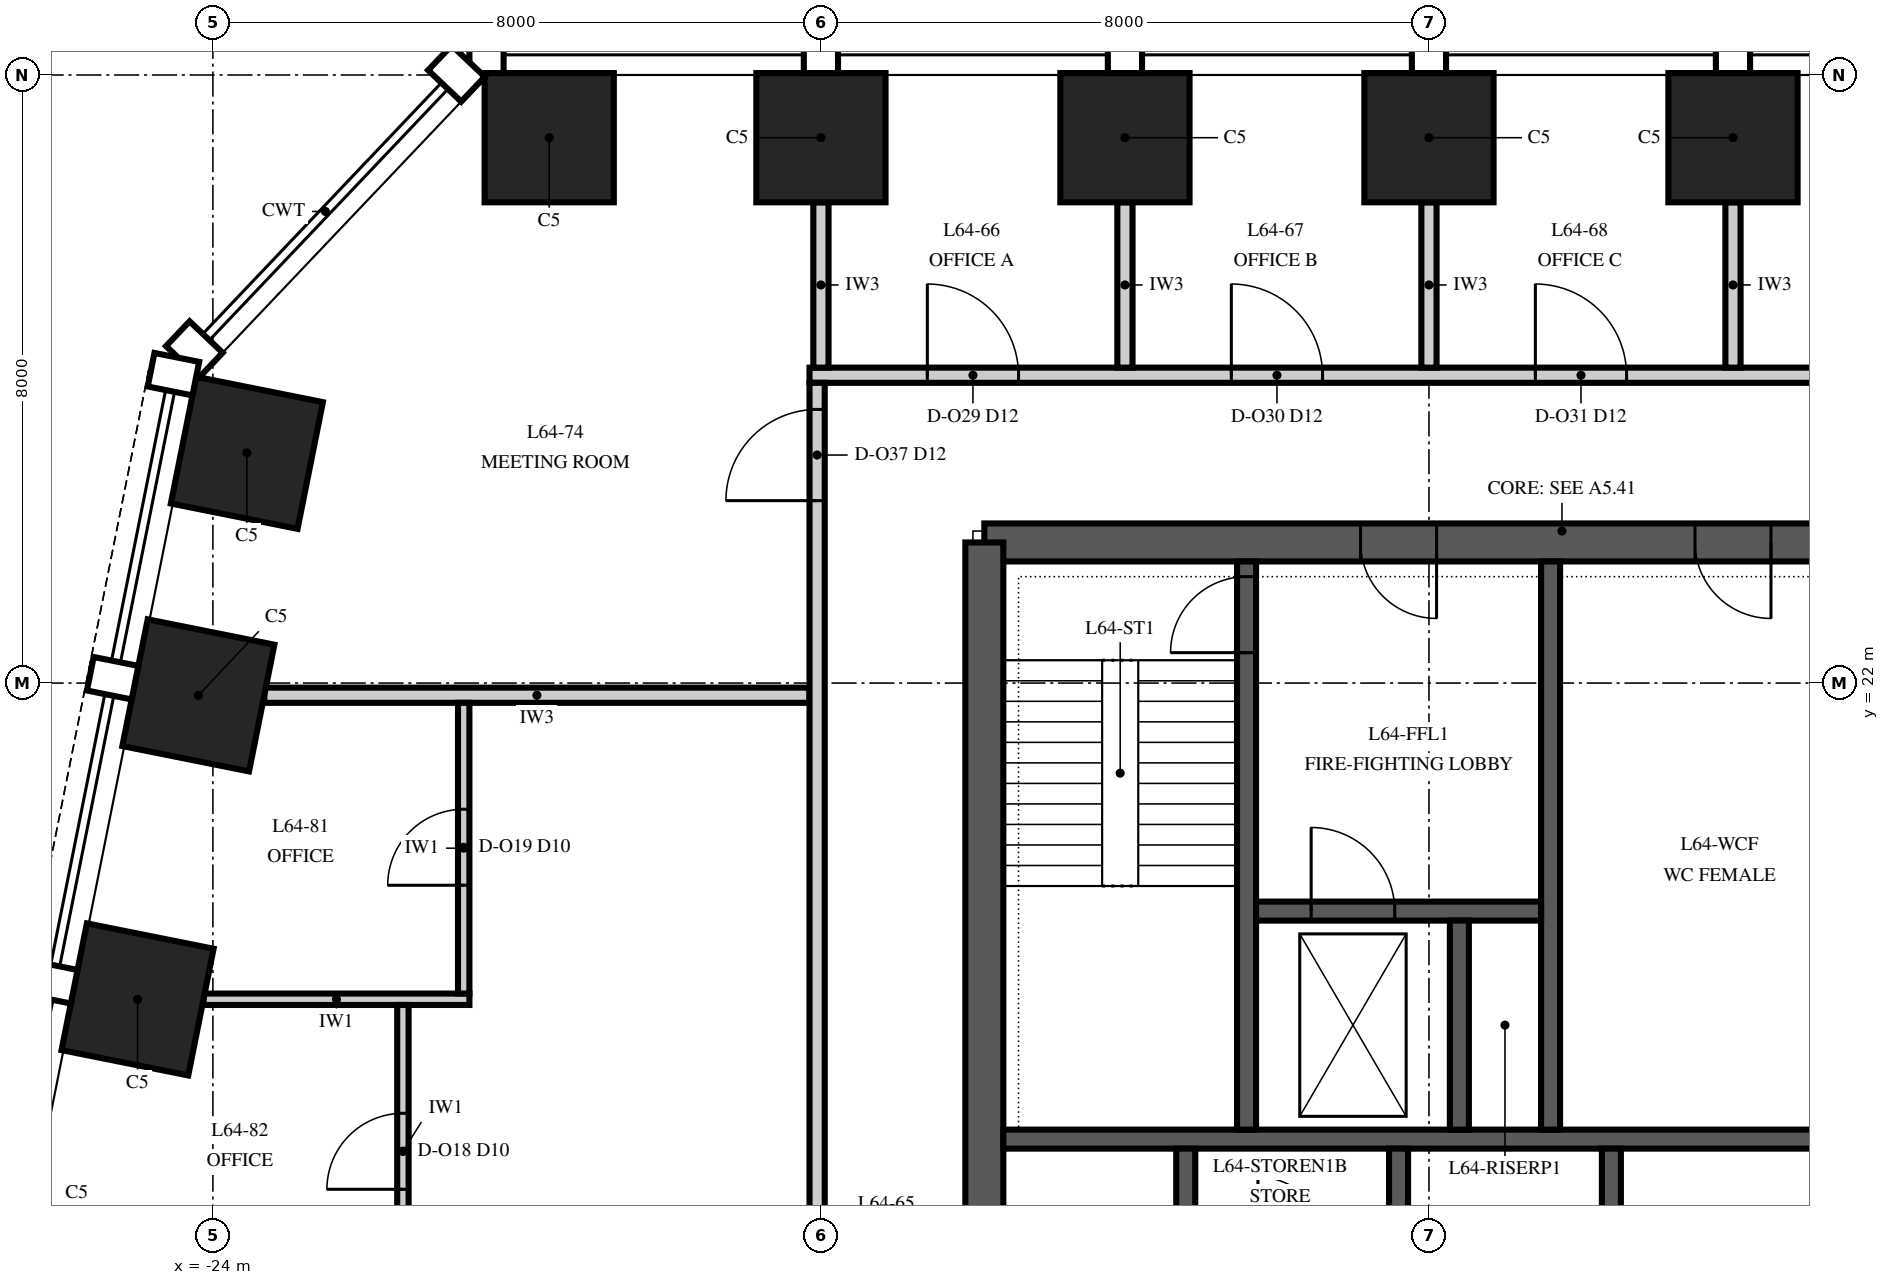
"""IFC4 building model, lengths in metres.
Left out: names, types, materials, properties, quantities, classifications, styles, units other than length and angle.
Written with IfcOpenShell. Run it as: python <this file> out.ifc"""

import sys

from ifc_helpers import new_model, si_unit, direction, frame, frame_2d, origin, origin_2d, place, context, subcontext, project, spatial, polyline, rectangle, outline, extrude, element, fill, save


model = new_model("IFC4")
c1 = context("Model", 3, precision=1e-05, world=origin(), true_north=direction((0.0, 1.0)))
c2 = subcontext(c1, "Body", "Model", "MODEL_VIEW")
j1 = project(units=[si_unit("LENGTHUNIT", "METRE"), si_unit("PLANEANGLEUNIT", "RADIAN")], contexts=[c1])
p1 = place(None, origin())
s1 = spatial("IfcSite", under=j1, at=p1, CompositionType="ELEMENT")
p2 = place(p1, origin())
s2 = spatial("IfcBuilding", under=s1, at=p2, CompositionType="ELEMENT")
p3 = place(p2, frame((0.0, 0.0, 276.0)))
s3 = spatial("IfcBuildingStorey", under=s2, at=p3, CompositionType="ELEMENT", Elevation=276.0)
for number, where, z_axis, x_axis in (
    (1, (-4.0, 29.175, 0.0), (0.0, 0.0, 1.0), (-1.0, 0.0, 0.0)),
    (2, (-8.0, 29.175, 0.0), (0.0, 0.0, 1.0), (-1.0, 0.0, 0.0)),
    (3, (-12.0, 29.175, 0.0), (0.0, 0.0, 1.0), (-1.0, 0.0, 0.0)),
    (4, (-16.0, 29.175, 0.0), (0.0, 0.0, 1.0), (-1.0, 0.0, 0.0)),
    (5, (-19.575, 29.175, 0.0), (0.0, 0.0, 1.0), (-1.0, 0.0, 0.0)),
    (6, (-23.553, 25.029, 0.0), (0.0, 0.0, 1.0), (-0.196, -0.981, 0.0)),
    (7, (-24.191, 21.838, 0.0), (0.0, 0.0, 1.0), (-0.196, -0.981, 0.0)),
    (8, (-24.991, 17.838, 0.0), (0.0, 0.0, 1.0), (-0.196, -0.981, 0.0)),
):
    element("IfcColumn", number, at=place(p3, frame(where, z_axis=z_axis, x_axis=x_axis)), inside=s3, PredefinedType="COLUMN", context=c2, shape_type="SweptSolid", body=[
        extrude(rectangle(XDim=1.7, YDim=1.7, at=origin_2d()), origin(), (0.0, 0.0, 1.0), 4.0),
    ])
p4 = place(p3, frame((13.85, 23.85, 0.0), z_axis=(0.0, 0.0, 1.0), x_axis=(-1.0, 0.0, 0.0)))
e9 = element("IfcWall", 9, at=p4, inside=s3, PredefinedType="SHEAR", context=c2, shape_type="SweptSolid", body=[
    extrude(rectangle(XDim=27.7, YDim=0.5, at=frame_2d((13.85, 0.0))), origin(), (0.0, 0.0, 1.0), 4.0),
])
p5 = place(p4, frame((21.75, 0.0, 0.0)))
e10 = element("IfcOpeningElement", 10, at=p5, cuts=e9, PredefinedType="OPENING", context=c2, shape_type="SweptSolid", body=[
    extrude(rectangle(XDim=1.0, YDim=2.1, at=frame_2d((0.5, 1.05))), frame((0.0, 0.265, 0.0), z_axis=(0.0, -1.0, 0.0), x_axis=(1.0, 0.0, 0.0)), (0.0, 0.0, 1.0), 0.53),
])
p6 = place(p4, frame((4.95, 0.0, 0.0)))
e11 = element("IfcOpeningElement", 11, at=p6, cuts=e9, PredefinedType="OPENING", context=c2, shape_type="SweptSolid", body=[
    extrude(rectangle(XDim=1.0, YDim=2.1, at=frame_2d((0.5, 1.05))), frame((0.0, 0.265, 0.0), z_axis=(0.0, -1.0, 0.0), x_axis=(1.0, 0.0, 0.0)), (0.0, 0.0, 1.0), 0.53),
])
p7 = place(p4, frame((17.35, 0.0, 0.0)))
e12 = element("IfcOpeningElement", 12, at=p7, cuts=e9, PredefinedType="OPENING", context=c2, shape_type="SweptSolid", body=[
    extrude(rectangle(XDim=1.0, YDim=2.1, at=frame_2d((0.5, 1.05))), frame((0.0, 0.265, 0.0), z_axis=(0.0, -1.0, 0.0), x_axis=(1.0, 0.0, 0.0)), (0.0, 0.0, 1.0), 0.53),
])
p8 = place(p4, frame((13.35, 0.0, 0.0)))
e13 = element("IfcOpeningElement", 13, at=p8, cuts=e9, PredefinedType="OPENING", context=c2, shape_type="SweptSolid", body=[
    extrude(rectangle(XDim=1.0, YDim=2.1, at=frame_2d((0.5, 1.05))), frame((0.0, 0.265, 0.0), z_axis=(0.0, -1.0, 0.0), x_axis=(1.0, 0.0, 0.0)), (0.0, 0.0, 1.0), 0.53),
])
p9 = place(p4, frame((9.35, 0.0, 0.0)))
e14 = element("IfcOpeningElement", 14, at=p9, cuts=e9, PredefinedType="OPENING", context=c2, shape_type="SweptSolid", body=[
    extrude(rectangle(XDim=1.0, YDim=2.1, at=frame_2d((0.5, 1.05))), frame((0.0, 0.265, 0.0), z_axis=(0.0, -1.0, 0.0), x_axis=(1.0, 0.0, 0.0)), (0.0, 0.0, 1.0), 0.53),
])
p10 = place(p3, frame((-13.85, 23.85, 0.0), z_axis=(0.0, 0.0, 1.0), x_axis=(0.0, -1.0, 0.0)))
e15 = element("IfcWall", 15, at=p10, inside=s3, PredefinedType="SHEAR", context=c2, shape_type="SweptSolid", body=[
    extrude(outline(polyline([(0.0, -0.25), (17.7, -0.25), (17.7, 0.0), (17.45, 0.0), (17.45, 0.25), (0.25, 0.25), (0.25, 0.0), (0.0, 0.0), (0.0, -0.25)])), origin(), (0.0, 0.0, 1.0), 4.0),
])
p11 = place(p10, frame((11.75, 0.0, 0.0)))
e16 = element("IfcOpeningElement", 16, at=p11, cuts=e15, PredefinedType="OPENING", context=c2, shape_type="SweptSolid", body=[
    extrude(rectangle(XDim=1.8, YDim=2.4, at=frame_2d((0.9, 1.2))), frame((0.0, 0.265, 0.0), z_axis=(0.0, -1.0, 0.0), x_axis=(1.0, 0.0, 0.0)), (0.0, 0.0, 1.0), 0.53),
])
p12 = place(p3, frame((-13.6, 16.0, 0.0), z_axis=(0.0, 0.0, 1.0), x_axis=(1.0, 0.0, 0.0)))
e17 = element("IfcWall", 17, at=p12, inside=s3, PredefinedType="SHEAR", context=c2, shape_type="SweptSolid", body=[
    extrude(rectangle(XDim=27.2, YDim=0.25, at=frame_2d((13.6, 0.0))), origin(), (0.0, 0.0, 1.0), 4.0),
])
for number, where, z_axis, x_axis in (
    (18, (-11.2, 13.125, 0.0), (0.0, 0.0, 1.0), (0.0, 1.0, 0.0)),
    (19, (-8.4, 13.125, 0.0), (0.0, 0.0, 1.0), (0.0, 1.0, 0.0)),
    (20, (-5.6, 13.125, 0.0), (0.0, 0.0, 1.0), (0.0, 1.0, 0.0)),
):
    element("IfcWall", number, at=place(p3, frame(where, z_axis=z_axis, x_axis=x_axis)), inside=s3, PredefinedType="SHEAR", context=c2, shape_type="SweptSolid", body=[
        extrude(rectangle(XDim=2.75, YDim=0.25, at=frame_2d((1.375, 0.0))), origin(), (0.0, 0.0, 1.0), 4.0),
    ])
p13 = place(p3, frame((-10.4, 16.125, 0.0), z_axis=(0.0, 0.0, 1.0), x_axis=(0.0, 1.0, 0.0)))
e21 = element("IfcWall", 21, at=p13, inside=s3, PredefinedType="SHEAR", context=c2, shape_type="SweptSolid", body=[
    extrude(rectangle(XDim=7.475, YDim=0.25, at=frame_2d((3.738, 0.0))), origin(), (0.0, 0.0, 1.0), 4.0),
])
p14 = place(p13, frame((6.275, 0.0, 0.0)))
e22 = element("IfcOpeningElement", 22, at=p14, cuts=e21, PredefinedType="OPENING", context=c2, shape_type="SweptSolid", body=[
    extrude(rectangle(XDim=1.0, YDim=2.1, at=frame_2d((0.5, 1.05))), frame((0.0, 0.14, 0.0), z_axis=(0.0, -1.0, 0.0), x_axis=(1.0, 0.0, 0.0)), (0.0, 0.0, 1.0), 0.28),
])
p15 = place(p3, frame((-6.4, 16.125, 0.0), z_axis=(0.0, 0.0, 1.0), x_axis=(0.0, 1.0, 0.0)))
e23 = element("IfcWall", 23, at=p15, inside=s3, PredefinedType="SHEAR", context=c2, shape_type="SweptSolid", body=[
    extrude(rectangle(XDim=7.475, YDim=0.25, at=frame_2d((3.738, 0.0))), origin(), (0.0, 0.0, 1.0), 4.0),
])
p16 = place(p3, frame((-10.275, 19.0, 0.0), z_axis=(0.0, 0.0, 1.0), x_axis=(1.0, 0.0, 0.0)))
e24 = element("IfcWall", 24, at=p16, inside=s3, PredefinedType="SHEAR", context=c2, shape_type="SweptSolid", body=[
    extrude(rectangle(XDim=3.75, YDim=0.25, at=frame_2d((1.875, 0.0))), origin(), (0.0, 0.0, 1.0), 4.0),
])
p17 = place(p16, frame((0.725, 0.0, 0.0)))
e25 = element("IfcOpeningElement", 25, at=p17, cuts=e24, PredefinedType="OPENING", context=c2, shape_type="SweptSolid", body=[
    extrude(rectangle(XDim=1.1, YDim=2.1, at=frame_2d((0.55, 1.05))), frame((0.0, 0.14, 0.0), z_axis=(0.0, -1.0, 0.0), x_axis=(1.0, 0.0, 0.0)), (0.0, 0.0, 1.0), 0.28),
])
p18 = place(p3, frame((-7.6, 16.125, 0.0), z_axis=(0.0, 0.0, 1.0), x_axis=(0.0, 1.0, 0.0)))
e26 = element("IfcWall", 26, at=p18, inside=s3, PredefinedType="SHEAR", context=c2, shape_type="SweptSolid", body=[
    extrude(rectangle(XDim=2.75, YDim=0.25, at=frame_2d((1.375, 0.0))), origin(), (0.0, 0.0, 1.0), 4.0),
])
p19 = place(p3, frame((-24.124, 17.84, 0.0), z_axis=(0.0, 0.0, 1.0), x_axis=(1.0, 0.0, 0.0)))
e27 = element("IfcWall", 27, at=p19, inside=s3, PredefinedType="PARTITIONING", context=c2, shape_type="SweptSolid", body=[
    extrude(rectangle(XDim=3.499, YDim=0.15, at=frame_2d((1.75, 0.0))), origin(), (0.0, 0.0, 1.0), 3.23),
])
p20 = place(p3, frame((-23.324, 21.84, 0.0), z_axis=(0.0, 0.0, 1.0), x_axis=(1.0, 0.0, 0.0)))
e28 = element("IfcWall", 28, at=p20, inside=s3, PredefinedType="PARTITIONING", context=c2, shape_type="SweptSolid", body=[
    extrude(rectangle(XDim=7.174, YDim=0.2, at=frame_2d((3.587, 0.0))), origin(), (0.0, 0.0, 1.0), 3.23),
])
p21 = place(p3, frame((-16.15, 26.05, 0.0), z_axis=(0.0, 0.0, 1.0), x_axis=(1.0, 0.0, 0.0)))
e29 = element("IfcWall", 29, at=p21, inside=s3, PredefinedType="PARTITIONING", context=c2, shape_type="SweptSolid", body=[
    extrude(rectangle(XDim=32.3, YDim=0.2, at=frame_2d((16.15, 0.0))), origin(), (0.0, 0.0, 1.0), 3.418),
])
p22 = place(p21, frame((1.55, 0.0, 0.0)))
e30 = element("IfcOpeningElement", 30, at=p22, cuts=e29, PredefinedType="OPENING", context=c2, shape_type="SweptSolid", body=[
    extrude(rectangle(XDim=1.2, YDim=2.4, at=frame_2d((0.6, 1.2))), frame((0.0, 0.115, 0.0), z_axis=(0.0, -1.0, 0.0), x_axis=(1.0, 0.0, 0.0)), (0.0, 0.0, 1.0), 0.23),
])
p23 = place(p21, frame((5.55, 0.0, 0.0)))
e31 = element("IfcOpeningElement", 31, at=p23, cuts=e29, PredefinedType="OPENING", context=c2, shape_type="SweptSolid", body=[
    extrude(rectangle(XDim=1.2, YDim=2.4, at=frame_2d((0.6, 1.2))), frame((0.0, 0.115, 0.0), z_axis=(0.0, -1.0, 0.0), x_axis=(1.0, 0.0, 0.0)), (0.0, 0.0, 1.0), 0.23),
])
p24 = place(p21, frame((9.55, 0.0, 0.0)))
e32 = element("IfcOpeningElement", 32, at=p24, cuts=e29, PredefinedType="OPENING", context=c2, shape_type="SweptSolid", body=[
    extrude(rectangle(XDim=1.2, YDim=2.4, at=frame_2d((0.6, 1.2))), frame((0.0, 0.115, 0.0), z_axis=(0.0, -1.0, 0.0), x_axis=(1.0, 0.0, 0.0)), (0.0, 0.0, 1.0), 0.23),
])
p25 = place(p21, frame((13.55, 0.0, 0.0)))
e33 = element("IfcOpeningElement", 33, at=p25, cuts=e29, PredefinedType="OPENING", context=c2, shape_type="SweptSolid", body=[
    extrude(rectangle(XDim=1.2, YDim=2.4, at=frame_2d((0.6, 1.2))), frame((0.0, 0.115, 0.0), z_axis=(0.0, -1.0, 0.0), x_axis=(1.0, 0.0, 0.0)), (0.0, 0.0, 1.0), 0.23),
])
p26 = place(p21, frame((17.55, 0.0, 0.0)))
e34 = element("IfcOpeningElement", 34, at=p26, cuts=e29, PredefinedType="OPENING", context=c2, shape_type="SweptSolid", body=[
    extrude(rectangle(XDim=1.2, YDim=2.4, at=frame_2d((0.6, 1.2))), frame((0.0, 0.115, 0.0), z_axis=(0.0, -1.0, 0.0), x_axis=(1.0, 0.0, 0.0)), (0.0, 0.0, 1.0), 0.23),
])
p27 = place(p21, frame((21.55, 0.0, 0.0)))
e35 = element("IfcOpeningElement", 35, at=p27, cuts=e29, PredefinedType="OPENING", context=c2, shape_type="SweptSolid", body=[
    extrude(rectangle(XDim=1.2, YDim=2.4, at=frame_2d((0.6, 1.2))), frame((0.0, 0.115, 0.0), z_axis=(0.0, -1.0, 0.0), x_axis=(1.0, 0.0, 0.0)), (0.0, 0.0, 1.0), 0.23),
])
p28 = place(p21, frame((25.55, 0.0, 0.0)))
e36 = element("IfcOpeningElement", 36, at=p28, cuts=e29, PredefinedType="OPENING", context=c2, shape_type="SweptSolid", body=[
    extrude(rectangle(XDim=1.2, YDim=2.4, at=frame_2d((0.6, 1.2))), frame((0.0, 0.115, 0.0), z_axis=(0.0, -1.0, 0.0), x_axis=(1.0, 0.0, 0.0)), (0.0, 0.0, 1.0), 0.23),
])
p29 = place(p21, frame((29.55, 0.0, 0.0)))
e37 = element("IfcOpeningElement", 37, at=p29, cuts=e29, PredefinedType="OPENING", context=c2, shape_type="SweptSolid", body=[
    extrude(rectangle(XDim=1.2, YDim=2.4, at=frame_2d((0.6, 1.2))), frame((0.0, 0.115, 0.0), z_axis=(0.0, -1.0, 0.0), x_axis=(1.0, 0.0, 0.0)), (0.0, 0.0, 1.0), 0.23),
])
p30 = place(p3, frame((-21.5, 13.915, 0.0), z_axis=(0.0, 0.0, 1.0), x_axis=(0.0, 1.0, 0.0)))
e38 = element("IfcWall", 38, at=p30, inside=s3, PredefinedType="PARTITIONING", context=c2, shape_type="SweptSolid", body=[
    extrude(rectangle(XDim=3.85, YDim=0.15, at=frame_2d((1.925, 0.0))), origin(), (0.0, 0.0, 1.0), 3.23),
])
p31 = place(p30, frame((1.425, 0.0, 0.0)))
e39 = element("IfcOpeningElement", 39, at=p31, cuts=e38, PredefinedType="OPENING", context=c2, shape_type="SweptSolid", body=[
    extrude(rectangle(XDim=1.0, YDim=2.3, at=frame_2d((0.5, 1.15))), frame((0.0, 0.09, 0.0), z_axis=(0.0, -1.0, 0.0), x_axis=(1.0, 0.0, 0.0)), (0.0, 0.0, 1.0), 0.18),
])
p32 = place(p3, frame((-20.7, 17.915, 0.0), z_axis=(0.0, 0.0, 1.0), x_axis=(0.0, 1.0, 0.0)))
e40 = element("IfcWall", 40, at=p32, inside=s3, PredefinedType="PARTITIONING", context=c2, shape_type="SweptSolid", body=[
    extrude(rectangle(XDim=3.825, YDim=0.15, at=frame_2d((1.913, 0.0))), origin(), (0.0, 0.0, 1.0), 3.23),
])
p33 = place(p32, frame((1.425, 0.0, 0.0)))
e41 = element("IfcOpeningElement", 41, at=p33, cuts=e40, PredefinedType="OPENING", context=c2, shape_type="SweptSolid", body=[
    extrude(rectangle(XDim=1.0, YDim=2.3, at=frame_2d((0.5, 1.15))), frame((0.0, 0.09, 0.0), z_axis=(0.0, -1.0, 0.0), x_axis=(1.0, 0.0, 0.0)), (0.0, 0.0, 1.0), 0.18),
])
p34 = place(p3, frame((-16.05, 1.94, 0.0), z_axis=(0.0, 0.0, 1.0), x_axis=(0.0, 1.0, 0.0)))
e42 = element("IfcWall", 42, at=p34, inside=s3, PredefinedType="PARTITIONING", context=c2, shape_type="SweptSolid", body=[
    extrude(rectangle(XDim=24.01, YDim=0.2, at=frame_2d((12.005, 0.0))), origin(), (0.0, 0.0, 1.0), 2.842),
])
p35 = place(p34, frame((8.46, 0.0, 0.0)))
e43 = element("IfcOpeningElement", 43, at=p35, cuts=e42, PredefinedType="OPENING", context=c2, shape_type="SweptSolid", body=[
    extrude(rectangle(XDim=1.2, YDim=2.4, at=frame_2d((0.6, 1.2))), frame((0.0, 0.115, 0.0), z_axis=(0.0, -1.0, 0.0), x_axis=(1.0, 0.0, 0.0)), (0.0, 0.0, 1.0), 0.23),
])
p36 = place(p34, frame((22.46, 0.0, 0.0)))
e44 = element("IfcOpeningElement", 44, at=p36, cuts=e42, PredefinedType="OPENING", context=c2, shape_type="SweptSolid", body=[
    extrude(rectangle(XDim=1.2, YDim=2.4, at=frame_2d((0.6, 1.2))), frame((0.0, 0.115, 0.0), z_axis=(0.0, -1.0, 0.0), x_axis=(1.0, 0.0, 0.0)), (0.0, 0.0, 1.0), 0.23),
])
for number, where, z_axis, x_axis in (
    (45, (-16.0, 26.15, 0.0), (0.0, 0.0, 1.0), (0.0, 1.0, 0.0)),
    (46, (-12.0, 26.15, 0.0), (0.0, 0.0, 1.0), (0.0, 1.0, 0.0)),
    (47, (-8.0, 26.15, 0.0), (0.0, 0.0, 1.0), (0.0, 1.0, 0.0)),
    (48, (-4.0, 26.15, 0.0), (0.0, 0.0, 1.0), (0.0, 1.0, 0.0)),
):
    element("IfcWall", number, at=place(p3, frame(where, z_axis=z_axis, x_axis=x_axis)), inside=s3, PredefinedType="PARTITIONING", context=c2, shape_type="SweptSolid", body=[
        extrude(rectangle(XDim=2.175, YDim=0.2, at=frame_2d((1.087, 0.0))), origin(), (0.0, 0.0, 1.0), 3.418),
    ])
p37 = place(p5, origin())
e49 = element("IfcDoor", 49, at=p37, inside=s3, OperationType="SINGLE_SWING_RIGHT", PredefinedType="DOOR", context=c2, shape_type="SweptSolid", body=[
    extrude(rectangle(XDim=1.0, YDim=2.1, at=frame_2d((0.5, 1.05))), frame((0.0, 0.25, 0.0), z_axis=(0.0, -1.0, 0.0), x_axis=(1.0, 0.0, 0.0)), (0.0, 0.0, 1.0), 0.5),
])
fill(e10, e49)
p38 = place(p7, origin())
e50 = element("IfcDoor", 50, at=p38, inside=s3, OperationType="SINGLE_SWING_LEFT", PredefinedType="DOOR", context=c2, shape_type="SweptSolid", body=[
    extrude(rectangle(XDim=1.0, YDim=2.1, at=frame_2d((0.5, 1.05))), frame((0.0, 0.25, 0.0), z_axis=(0.0, -1.0, 0.0), x_axis=(1.0, 0.0, 0.0)), (0.0, 0.0, 1.0), 0.5),
])
fill(e12, e50)
p39 = place(p14, origin())
e51 = element("IfcDoor", 51, at=p39, inside=s3, OperationType="SINGLE_SWING_LEFT", PredefinedType="DOOR", context=c2, shape_type="SweptSolid", body=[
    extrude(rectangle(XDim=1.0, YDim=2.1, at=frame_2d((0.5, 1.05))), frame((0.0, 0.125, 0.0), z_axis=(0.0, -1.0, 0.0), x_axis=(1.0, 0.0, 0.0)), (0.0, 0.0, 1.0), 0.25),
])
fill(e22, e51)
p40 = place(p17, origin())
e52 = element("IfcDoor", 52, at=p40, inside=s3, OperationType="SLIDING_TO_RIGHT", PredefinedType="DOOR", context=c2, shape_type="SweptSolid", body=[
    extrude(rectangle(XDim=1.1, YDim=2.1, at=frame_2d((0.55, 1.05))), frame((0.0, 0.125, 0.0), z_axis=(0.0, -1.0, 0.0), x_axis=(1.0, 0.0, 0.0)), (0.0, 0.0, 1.0), 0.25),
])
fill(e25, e52)
p41 = place(p31, origin())
e53 = element("IfcDoor", 53, at=p41, inside=s3, OperationType="SINGLE_SWING_LEFT", PredefinedType="DOOR", context=c2, shape_type="SweptSolid", body=[
    extrude(rectangle(XDim=1.0, YDim=2.3, at=frame_2d((0.5, 1.15))), frame((0.0, 0.075, 0.0), z_axis=(0.0, -1.0, 0.0), x_axis=(1.0, 0.0, 0.0)), (0.0, 0.0, 1.0), 0.149),
])
fill(e39, e53)
p42 = place(p33, origin())
e54 = element("IfcDoor", 54, at=p42, inside=s3, OperationType="SINGLE_SWING_LEFT", PredefinedType="DOOR", context=c2, shape_type="SweptSolid", body=[
    extrude(rectangle(XDim=1.0, YDim=2.3, at=frame_2d((0.5, 1.15))), frame((0.0, 0.075, 0.0), z_axis=(0.0, -1.0, 0.0), x_axis=(1.0, 0.0, 0.0)), (0.0, 0.0, 1.0), 0.149),
])
fill(e41, e54)
p43 = place(p22, origin())
e55 = element("IfcDoor", 55, at=p43, inside=s3, OperationType="SINGLE_SWING_LEFT", PredefinedType="DOOR", context=c2, shape_type="SweptSolid", body=[
    extrude(rectangle(XDim=1.2, YDim=2.4, at=frame_2d((0.6, 1.2))), frame((0.0, 0.1, 0.0), z_axis=(0.0, -1.0, 0.0), x_axis=(1.0, 0.0, 0.0)), (0.0, 0.0, 1.0), 0.199),
])
fill(e30, e55)
p44 = place(p23, origin())
e56 = element("IfcDoor", 56, at=p44, inside=s3, OperationType="SINGLE_SWING_LEFT", PredefinedType="DOOR", context=c2, shape_type="SweptSolid", body=[
    extrude(rectangle(XDim=1.2, YDim=2.4, at=frame_2d((0.6, 1.2))), frame((0.0, 0.1, 0.0), z_axis=(0.0, -1.0, 0.0), x_axis=(1.0, 0.0, 0.0)), (0.0, 0.0, 1.0), 0.199),
])
fill(e31, e56)
p45 = place(p24, origin())
e57 = element("IfcDoor", 57, at=p45, inside=s3, OperationType="SINGLE_SWING_LEFT", PredefinedType="DOOR", context=c2, shape_type="SweptSolid", body=[
    extrude(rectangle(XDim=1.2, YDim=2.4, at=frame_2d((0.6, 1.2))), frame((0.0, 0.1, 0.0), z_axis=(0.0, -1.0, 0.0), x_axis=(1.0, 0.0, 0.0)), (0.0, 0.0, 1.0), 0.199),
])
fill(e32, e57)
p46 = place(p36, origin())
e58 = element("IfcDoor", 58, at=p46, inside=s3, OperationType="SINGLE_SWING_LEFT", PredefinedType="DOOR", context=c2, shape_type="SweptSolid", body=[
    extrude(rectangle(XDim=1.2, YDim=2.4, at=frame_2d((0.6, 1.2))), frame((0.0, 0.1, 0.0), z_axis=(0.0, -1.0, 0.0), x_axis=(1.0, 0.0, 0.0)), (0.0, 0.0, 1.0), 0.199),
])
fill(e44, e58)
save(model, sys.argv[1])
